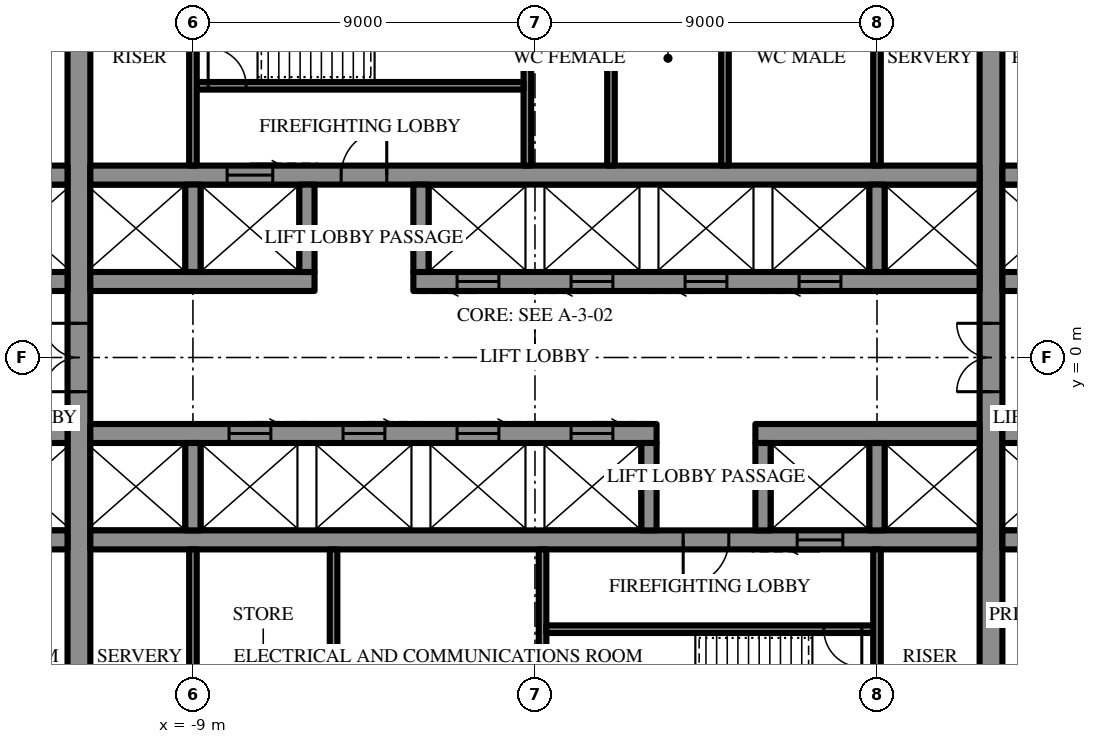
"""IFC4 building model, lengths in metres.
Left out: names, types, materials, properties, quantities, classifications, styles, units other than length and angle.
Written with IfcOpenShell. Run it as: python <this file> out.ifc"""

import sys

from ifc_helpers import new_model, si_unit, direction, frame, frame_2d, origin, place, context, subcontext, project, spatial, rectangle, extrude, element, fill, save


model = new_model("IFC4")
c1 = context("Model", 3, precision=1e-05, world=origin(), true_north=direction((0.0, 1.0)))
c2 = subcontext(c1, "Body", "Model", "MODEL_VIEW")
j1 = project(units=[si_unit("LENGTHUNIT", "METRE"), si_unit("PLANEANGLEUNIT", "RADIAN")], contexts=[c1])
p1 = place(None, origin())
s1 = spatial("IfcSite", under=j1, at=p1, CompositionType="ELEMENT")
p2 = place(p1, origin())
s2 = spatial("IfcBuilding", under=s1, at=p2, CompositionType="ELEMENT")
p3 = place(p2, frame((0.0, 0.0, 140.5)))
s3 = spatial("IfcBuildingStorey", under=s2, at=p3, CompositionType="ELEMENT", Elevation=140.5)
p4 = place(p3, frame((12.0, -10.7, 0.0), z_axis=(0.0, 0.0, 1.0), x_axis=(0.0, 1.0, 0.0)))
e1 = element("IfcWall", 1, at=p4, inside=s3, PredefinedType="SHEAR", context=c2, shape_type="SweptSolid", body=[
    extrude(rectangle(XDim=21.4, YDim=0.6, at=frame_2d((10.7, 0.0))), origin(), (0.0, 0.0, 1.0), 4.2),
])
p5 = place(p4, frame((9.8, 0.0, 0.0)))
e2 = element("IfcOpeningElement", 2, at=p5, cuts=e1, PredefinedType="OPENING", context=c2, shape_type="SweptSolid", body=[
    extrude(rectangle(XDim=1.8, YDim=2.4, at=frame_2d((0.9, 1.2))), frame((0.0, 0.31, 0.0), z_axis=(0.0, -1.0, 0.0), x_axis=(1.0, 0.0, 0.0)), (0.0, 0.0, 1.0), 0.62),
])
p6 = place(p3, frame((-12.0, -10.7, 0.0), z_axis=(0.0, 0.0, 1.0), x_axis=(0.0, 1.0, 0.0)))
e3 = element("IfcWall", 3, at=p6, inside=s3, PredefinedType="SHEAR", context=c2, shape_type="SweptSolid", body=[
    extrude(rectangle(XDim=21.4, YDim=0.6, at=frame_2d((10.7, 0.0))), origin(), (0.0, 0.0, 1.0), 4.2),
])
p7 = place(p6, frame((9.8, 0.0, 0.0)))
e4 = element("IfcOpeningElement", 4, at=p7, cuts=e3, PredefinedType="OPENING", context=c2, shape_type="SweptSolid", body=[
    extrude(rectangle(XDim=1.8, YDim=2.4, at=frame_2d((0.9, 1.2))), frame((0.0, 0.31, 0.0), z_axis=(0.0, -1.0, 0.0), x_axis=(1.0, 0.0, 0.0)), (0.0, 0.0, 1.0), 0.62),
])
p8 = place(p3, frame((-14.7, 2.0, 0.0), z_axis=(0.0, 0.0, 1.0), x_axis=(1.0, 0.0, 0.0)))
e5 = element("IfcWall", 5, at=p8, inside=s3, PredefinedType="SHEAR", context=c2, shape_type="SweptSolid", body=[
    extrude(rectangle(XDim=2.4, YDim=0.5, at=frame_2d((1.2, 0.0))), origin(), (0.0, 0.0, 1.0), 4.2),
])
p9 = place(p3, frame((-11.7, 2.0, 0.0), z_axis=(0.0, 0.0, 1.0), x_axis=(1.0, 0.0, 0.0)))
e6 = element("IfcWall", 6, at=p9, inside=s3, PredefinedType="SHEAR", context=c2, shape_type="SweptSolid", body=[
    extrude(rectangle(XDim=5.9, YDim=0.5, at=frame_2d((2.95, 0.0))), origin(), (0.0, 0.0, 1.0), 4.2),
])
p10 = place(p3, frame((-3.2, 2.0, 0.0), z_axis=(0.0, 0.0, 1.0), x_axis=(1.0, 0.0, 0.0)))
e7 = element("IfcWall", 7, at=p10, inside=s3, PredefinedType="SHEAR", context=c2, shape_type="SweptSolid", body=[
    extrude(rectangle(XDim=14.9, YDim=0.5, at=frame_2d((7.45, 0.0))), origin(), (0.0, 0.0, 1.0), 4.2),
])
p11 = place(p10, frame((1.15, 0.0, 0.0)))
e8 = element("IfcOpeningElement", 8, at=p11, cuts=e7, PredefinedType="OPENING", context=c2, shape_type="SweptSolid", body=[
    extrude(rectangle(XDim=1.1, YDim=2.2, at=frame_2d((0.55, 1.1))), frame((0.0, 0.26, 0.0), z_axis=(0.0, -1.0, 0.0), x_axis=(1.0, 0.0, 0.0)), (0.0, 0.0, 1.0), 0.52),
])
p12 = place(p10, frame((4.15, 0.0, 0.0)))
e9 = element("IfcOpeningElement", 9, at=p12, cuts=e7, PredefinedType="OPENING", context=c2, shape_type="SweptSolid", body=[
    extrude(rectangle(XDim=1.1, YDim=2.2, at=frame_2d((0.55, 1.1))), frame((0.0, 0.26, 0.0), z_axis=(0.0, -1.0, 0.0), x_axis=(1.0, 0.0, 0.0)), (0.0, 0.0, 1.0), 0.52),
])
p13 = place(p10, frame((7.15, 0.0, 0.0)))
e10 = element("IfcOpeningElement", 10, at=p13, cuts=e7, PredefinedType="OPENING", context=c2, shape_type="SweptSolid", body=[
    extrude(rectangle(XDim=1.1, YDim=2.2, at=frame_2d((0.55, 1.1))), frame((0.0, 0.26, 0.0), z_axis=(0.0, -1.0, 0.0), x_axis=(1.0, 0.0, 0.0)), (0.0, 0.0, 1.0), 0.52),
])
p14 = place(p10, frame((10.15, 0.0, 0.0)))
e11 = element("IfcOpeningElement", 11, at=p14, cuts=e7, PredefinedType="OPENING", context=c2, shape_type="SweptSolid", body=[
    extrude(rectangle(XDim=1.1, YDim=2.2, at=frame_2d((0.55, 1.1))), frame((0.0, 0.26, 0.0), z_axis=(0.0, -1.0, 0.0), x_axis=(1.0, 0.0, 0.0)), (0.0, 0.0, 1.0), 0.52),
])
for number, where, z_axis, x_axis in (
    (12, (12.3, 2.0, 0.0), (0.0, 0.0, 1.0), (1.0, 0.0, 0.0)),
    (13, (-14.7, 4.8, 0.0), (0.0, 0.0, 1.0), (1.0, 0.0, 0.0)),
):
    element("IfcWall", number, at=place(p3, frame(where, z_axis=z_axis, x_axis=x_axis)), inside=s3, PredefinedType="SHEAR", context=c2, shape_type="SweptSolid", body=[
        extrude(rectangle(XDim=2.4, YDim=0.5, at=frame_2d((1.2, 0.0))), origin(), (0.0, 0.0, 1.0), 4.2),
    ])
p15 = place(p3, frame((-11.7, 4.8, 0.0), z_axis=(0.0, 0.0, 1.0), x_axis=(1.0, 0.0, 0.0)))
e14 = element("IfcWall", 14, at=p15, inside=s3, PredefinedType="SHEAR", context=c2, shape_type="SweptSolid", body=[
    extrude(rectangle(XDim=23.4, YDim=0.5, at=frame_2d((11.7, 0.0))), origin(), (0.0, 0.0, 1.0), 4.2),
])
p16 = place(p15, frame((6.6, 0.0, 0.0)))
e15 = element("IfcOpeningElement", 15, at=p16, cuts=e14, PredefinedType="OPENING", context=c2, shape_type="SweptSolid", body=[
    extrude(rectangle(XDim=1.2, YDim=2.2, at=frame_2d((0.6, 1.1))), frame((0.0, 0.26, 0.0), z_axis=(0.0, -1.0, 0.0), x_axis=(1.0, 0.0, 0.0)), (0.0, 0.0, 1.0), 0.52),
])
p17 = place(p15, frame((3.6, 0.0, 0.0)))
e16 = element("IfcOpeningElement", 16, at=p17, cuts=e14, PredefinedType="OPENING", context=c2, shape_type="SweptSolid", body=[
    extrude(rectangle(XDim=1.2, YDim=2.2, at=frame_2d((0.6, 1.1))), frame((0.0, 0.26, 0.0), z_axis=(0.0, -1.0, 0.0), x_axis=(1.0, 0.0, 0.0)), (0.0, 0.0, 1.0), 0.52),
])
p18 = place(p3, frame((12.3, 4.8, 0.0), z_axis=(0.0, 0.0, 1.0), x_axis=(1.0, 0.0, 0.0)))
e17 = element("IfcWall", 17, at=p18, inside=s3, PredefinedType="SHEAR", context=c2, shape_type="SweptSolid", body=[
    extrude(rectangle(XDim=2.4, YDim=0.5, at=frame_2d((1.2, 0.0))), origin(), (0.0, 0.0, 1.0), 4.2),
])
for number, where, z_axis, x_axis in (
    (18, (-9.0, 2.25, 0.0), (0.0, 0.0, 1.0), (0.0, 1.0, 0.0)),
    (19, (-6.0, 2.25, 0.0), (0.0, 0.0, 1.0), (0.0, 1.0, 0.0)),
    (20, (-3.0, 2.25, 0.0), (0.0, 0.0, 1.0), (0.0, 1.0, 0.0)),
    (21, (9.0, 2.25, 0.0), (0.0, 0.0, 1.0), (0.0, 1.0, 0.0)),
):
    element("IfcWall", number, at=place(p3, frame(where, z_axis=z_axis, x_axis=x_axis)), inside=s3, PredefinedType="SHEAR", context=c2, shape_type="SweptSolid", body=[
        extrude(rectangle(XDim=2.3, YDim=0.4, at=frame_2d((1.15, 0.0))), origin(), (0.0, 0.0, 1.0), 4.2),
    ])
p19 = place(p3, frame((-0.2, 5.05, 0.0), z_axis=(0.0, 0.0, 1.0), x_axis=(0.0, 1.0, 0.0)))
e22 = element("IfcWall", 22, at=p19, inside=s3, PredefinedType="SHEAR", context=c2, shape_type="SweptSolid", body=[
    extrude(rectangle(XDim=5.65, YDim=0.2, at=frame_2d((2.825, 0.0))), origin(), (0.0, 0.0, 1.0), 4.2),
])
p20 = place(p3, frame((-8.9, 7.15, 0.0), z_axis=(0.0, 0.0, 1.0), x_axis=(1.0, 0.0, 0.0)))
e23 = element("IfcWall", 23, at=p20, inside=s3, PredefinedType="SHEAR", context=c2, shape_type="SweptSolid", body=[
    extrude(rectangle(XDim=8.6, YDim=0.2, at=frame_2d((4.3, 0.0))), origin(), (0.0, 0.0, 1.0), 4.2),
])
p21 = place(p20, frame((0.3, 0.0, 0.0)))
e24 = element("IfcOpeningElement", 24, at=p21, cuts=e23, PredefinedType="OPENING", context=c2, shape_type="SweptSolid", body=[
    extrude(rectangle(XDim=1.0, YDim=2.2, at=frame_2d((0.5, 1.1))), frame((0.0, 0.11, 0.0), z_axis=(0.0, -1.0, 0.0), x_axis=(1.0, 0.0, 0.0)), (0.0, 0.0, 1.0), 0.22),
])
p22 = place(p3, frame((14.7, -2.0, 0.0), z_axis=(0.0, 0.0, 1.0), x_axis=(-1.0, 0.0, 0.0)))
e25 = element("IfcWall", 25, at=p22, inside=s3, PredefinedType="SHEAR", context=c2, shape_type="SweptSolid", body=[
    extrude(rectangle(XDim=2.4, YDim=0.5, at=frame_2d((1.2, 0.0))), origin(), (0.0, 0.0, 1.0), 4.2),
])
p23 = place(p3, frame((11.7, -2.0, 0.0), z_axis=(0.0, 0.0, 1.0), x_axis=(-1.0, 0.0, 0.0)))
e26 = element("IfcWall", 26, at=p23, inside=s3, PredefinedType="SHEAR", context=c2, shape_type="SweptSolid", body=[
    extrude(rectangle(XDim=5.9, YDim=0.5, at=frame_2d((2.95, 0.0))), origin(), (0.0, 0.0, 1.0), 4.2),
])
p24 = place(p3, frame((3.2, -2.0, 0.0), z_axis=(0.0, 0.0, 1.0), x_axis=(-1.0, 0.0, 0.0)))
e27 = element("IfcWall", 27, at=p24, inside=s3, PredefinedType="SHEAR", context=c2, shape_type="SweptSolid", body=[
    extrude(rectangle(XDim=14.9, YDim=0.5, at=frame_2d((7.45, 0.0))), origin(), (0.0, 0.0, 1.0), 4.2),
])
p25 = place(p24, frame((1.15, 0.0, 0.0)))
e28 = element("IfcOpeningElement", 28, at=p25, cuts=e27, PredefinedType="OPENING", context=c2, shape_type="SweptSolid", body=[
    extrude(rectangle(XDim=1.1, YDim=2.2, at=frame_2d((0.55, 1.1))), frame((0.0, 0.26, 0.0), z_axis=(0.0, -1.0, 0.0), x_axis=(1.0, 0.0, 0.0)), (0.0, 0.0, 1.0), 0.52),
])
p26 = place(p24, frame((4.15, 0.0, 0.0)))
e29 = element("IfcOpeningElement", 29, at=p26, cuts=e27, PredefinedType="OPENING", context=c2, shape_type="SweptSolid", body=[
    extrude(rectangle(XDim=1.1, YDim=2.2, at=frame_2d((0.55, 1.1))), frame((0.0, 0.26, 0.0), z_axis=(0.0, -1.0, 0.0), x_axis=(1.0, 0.0, 0.0)), (0.0, 0.0, 1.0), 0.52),
])
p27 = place(p24, frame((7.15, 0.0, 0.0)))
e30 = element("IfcOpeningElement", 30, at=p27, cuts=e27, PredefinedType="OPENING", context=c2, shape_type="SweptSolid", body=[
    extrude(rectangle(XDim=1.1, YDim=2.2, at=frame_2d((0.55, 1.1))), frame((0.0, 0.26, 0.0), z_axis=(0.0, -1.0, 0.0), x_axis=(1.0, 0.0, 0.0)), (0.0, 0.0, 1.0), 0.52),
])
p28 = place(p24, frame((10.15, 0.0, 0.0)))
e31 = element("IfcOpeningElement", 31, at=p28, cuts=e27, PredefinedType="OPENING", context=c2, shape_type="SweptSolid", body=[
    extrude(rectangle(XDim=1.1, YDim=2.2, at=frame_2d((0.55, 1.1))), frame((0.0, 0.26, 0.0), z_axis=(0.0, -1.0, 0.0), x_axis=(1.0, 0.0, 0.0)), (0.0, 0.0, 1.0), 0.52),
])
for number, where, z_axis, x_axis in (
    (32, (-12.3, -2.0, 0.0), (0.0, 0.0, 1.0), (-1.0, 0.0, 0.0)),
    (33, (14.7, -4.8, 0.0), (0.0, 0.0, 1.0), (-1.0, 0.0, 0.0)),
):
    element("IfcWall", number, at=place(p3, frame(where, z_axis=z_axis, x_axis=x_axis)), inside=s3, PredefinedType="SHEAR", context=c2, shape_type="SweptSolid", body=[
        extrude(rectangle(XDim=2.4, YDim=0.5, at=frame_2d((1.2, 0.0))), origin(), (0.0, 0.0, 1.0), 4.2),
    ])
p29 = place(p3, frame((11.7, -4.8, 0.0), z_axis=(0.0, 0.0, 1.0), x_axis=(-1.0, 0.0, 0.0)))
e34 = element("IfcWall", 34, at=p29, inside=s3, PredefinedType="SHEAR", context=c2, shape_type="SweptSolid", body=[
    extrude(rectangle(XDim=23.4, YDim=0.5, at=frame_2d((11.7, 0.0))), origin(), (0.0, 0.0, 1.0), 4.2),
])
p30 = place(p29, frame((6.6, 0.0, 0.0)))
e35 = element("IfcOpeningElement", 35, at=p30, cuts=e34, PredefinedType="OPENING", context=c2, shape_type="SweptSolid", body=[
    extrude(rectangle(XDim=1.2, YDim=2.2, at=frame_2d((0.6, 1.1))), frame((0.0, 0.26, 0.0), z_axis=(0.0, -1.0, 0.0), x_axis=(1.0, 0.0, 0.0)), (0.0, 0.0, 1.0), 0.52),
])
p31 = place(p29, frame((3.6, 0.0, 0.0)))
e36 = element("IfcOpeningElement", 36, at=p31, cuts=e34, PredefinedType="OPENING", context=c2, shape_type="SweptSolid", body=[
    extrude(rectangle(XDim=1.2, YDim=2.2, at=frame_2d((0.6, 1.1))), frame((0.0, 0.26, 0.0), z_axis=(0.0, -1.0, 0.0), x_axis=(1.0, 0.0, 0.0)), (0.0, 0.0, 1.0), 0.52),
])
p32 = place(p3, frame((-12.3, -4.8, 0.0), z_axis=(0.0, 0.0, 1.0), x_axis=(-1.0, 0.0, 0.0)))
e37 = element("IfcWall", 37, at=p32, inside=s3, PredefinedType="SHEAR", context=c2, shape_type="SweptSolid", body=[
    extrude(rectangle(XDim=2.4, YDim=0.5, at=frame_2d((1.2, 0.0))), origin(), (0.0, 0.0, 1.0), 4.2),
])
for number, where, z_axis, x_axis in (
    (38, (9.0, -2.25, 0.0), (0.0, 0.0, 1.0), (0.0, -1.0, 0.0)),
    (39, (6.0, -2.25, 0.0), (0.0, 0.0, 1.0), (0.0, -1.0, 0.0)),
    (40, (3.0, -2.25, 0.0), (0.0, 0.0, 1.0), (0.0, -1.0, 0.0)),
    (41, (-9.0, -2.25, 0.0), (0.0, 0.0, 1.0), (0.0, -1.0, 0.0)),
):
    element("IfcWall", number, at=place(p3, frame(where, z_axis=z_axis, x_axis=x_axis)), inside=s3, PredefinedType="SHEAR", context=c2, shape_type="SweptSolid", body=[
        extrude(rectangle(XDim=2.3, YDim=0.4, at=frame_2d((1.15, 0.0))), origin(), (0.0, 0.0, 1.0), 4.2),
    ])
p33 = place(p3, frame((0.2, -5.05, 0.0), z_axis=(0.0, 0.0, 1.0), x_axis=(0.0, -1.0, 0.0)))
e42 = element("IfcWall", 42, at=p33, inside=s3, PredefinedType="SHEAR", context=c2, shape_type="SweptSolid", body=[
    extrude(rectangle(XDim=5.65, YDim=0.2, at=frame_2d((2.825, 0.0))), origin(), (0.0, 0.0, 1.0), 4.2),
])
p34 = place(p3, frame((8.9, -7.15, 0.0), z_axis=(0.0, 0.0, 1.0), x_axis=(-1.0, 0.0, 0.0)))
e43 = element("IfcWall", 43, at=p34, inside=s3, PredefinedType="SHEAR", context=c2, shape_type="SweptSolid", body=[
    extrude(rectangle(XDim=8.6, YDim=0.2, at=frame_2d((4.3, 0.0))), origin(), (0.0, 0.0, 1.0), 4.2),
])
p35 = place(p34, frame((0.3, 0.0, 0.0)))
e44 = element("IfcOpeningElement", 44, at=p35, cuts=e43, PredefinedType="OPENING", context=c2, shape_type="SweptSolid", body=[
    extrude(rectangle(XDim=1.0, YDim=2.2, at=frame_2d((0.5, 1.1))), frame((0.0, 0.11, 0.0), z_axis=(0.0, -1.0, 0.0), x_axis=(1.0, 0.0, 0.0)), (0.0, 0.0, 1.0), 0.22),
])
for number, where, z_axis, x_axis in (
    (45, (-9.0, 5.05, 0.0), (0.0, 0.0, 1.0), (0.0, 1.0, 0.0)),
    (46, (9.0, 5.05, 0.0), (0.0, 0.0, 1.0), (0.0, 1.0, 0.0)),
    (47, (2.0, 5.05, 0.0), (0.0, 0.0, 1.0), (0.0, 1.0, 0.0)),
    (48, (5.0, 5.05, 0.0), (0.0, 0.0, 1.0), (0.0, 1.0, 0.0)),
    (49, (9.0, -5.05, 0.0), (0.0, 0.0, 1.0), (0.0, -1.0, 0.0)),
    (50, (-9.0, -5.05, 0.0), (0.0, 0.0, 1.0), (0.0, -1.0, 0.0)),
    (51, (-5.3, -5.05, 0.0), (0.0, 0.0, 1.0), (0.0, -1.0, 0.0)),
):
    element("IfcWall", number, at=place(p3, frame(where, z_axis=z_axis, x_axis=x_axis)), inside=s3, PredefinedType="PARTITIONING", context=c2, shape_type="SweptSolid", body=[
        extrude(rectangle(XDim=5.65, YDim=0.2, at=frame_2d((2.825, 0.0))), origin(), (0.0, 0.0, 1.0), 4.0),
    ])
p36 = place(p16, origin())
e52 = element("IfcDoor", 52, at=p36, inside=s3, OperationType="SINGLE_SWING_LEFT", PredefinedType="DOOR", context=c2, shape_type="SweptSolid", body=[
    extrude(rectangle(XDim=1.2, YDim=2.2, at=frame_2d((0.6, 1.1))), frame((0.0, 0.025, 0.0), z_axis=(0.0, -1.0, 0.0), x_axis=(1.0, 0.0, 0.0)), (0.0, 0.0, 1.0), 0.05),
])
fill(e15, e52)
p37 = place(p21, origin())
e53 = element("IfcDoor", 53, at=p37, inside=s3, OperationType="SINGLE_SWING_RIGHT", PredefinedType="DOOR", context=c2, shape_type="SweptSolid", body=[
    extrude(rectangle(XDim=1.0, YDim=2.2, at=frame_2d((0.5, 1.1))), frame((0.0, 0.025, 0.0), z_axis=(0.0, -1.0, 0.0), x_axis=(1.0, 0.0, 0.0)), (0.0, 0.0, 1.0), 0.05),
])
fill(e24, e53)
p38 = place(p30, origin())
e54 = element("IfcDoor", 54, at=p38, inside=s3, OperationType="SINGLE_SWING_LEFT", PredefinedType="DOOR", context=c2, shape_type="SweptSolid", body=[
    extrude(rectangle(XDim=1.2, YDim=2.2, at=frame_2d((0.6, 1.1))), frame((0.0, 0.025, 0.0), z_axis=(0.0, -1.0, 0.0), x_axis=(1.0, 0.0, 0.0)), (0.0, 0.0, 1.0), 0.05),
])
fill(e35, e54)
p39 = place(p35, origin())
e55 = element("IfcDoor", 55, at=p39, inside=s3, OperationType="SINGLE_SWING_RIGHT", PredefinedType="DOOR", context=c2, shape_type="SweptSolid", body=[
    extrude(rectangle(XDim=1.0, YDim=2.2, at=frame_2d((0.5, 1.1))), frame((0.0, 0.025, 0.0), z_axis=(0.0, -1.0, 0.0), x_axis=(1.0, 0.0, 0.0)), (0.0, 0.0, 1.0), 0.05),
])
fill(e44, e55)
p40 = place(p5, origin())
e56 = element("IfcDoor", 56, at=p40, inside=s3, OperationType="DOUBLE_DOOR_SINGLE_SWING", PredefinedType="DOOR", context=c2, shape_type="SweptSolid", body=[
    extrude(rectangle(XDim=1.8, YDim=2.4, at=frame_2d((0.9, 1.2))), frame((0.0, 0.025, 0.0), z_axis=(0.0, -1.0, 0.0), x_axis=(1.0, 0.0, 0.0)), (0.0, 0.0, 1.0), 0.05),
])
fill(e2, e56)
p41 = place(p7, origin())
e57 = element("IfcDoor", 57, at=p41, inside=s3, OperationType="DOUBLE_DOOR_SINGLE_SWING", PredefinedType="DOOR", context=c2, shape_type="SweptSolid", body=[
    extrude(rectangle(XDim=1.8, YDim=2.4, at=frame_2d((0.9, 1.2))), frame((0.0, 0.025, 0.0), z_axis=(0.0, -1.0, 0.0), x_axis=(1.0, 0.0, 0.0)), (0.0, 0.0, 1.0), 0.05),
])
fill(e4, e57)
p42 = place(p17, origin())
e58 = element("IfcDoor", 58, at=p42, inside=s3, OperationType="SLIDING_TO_LEFT", PredefinedType="DOOR", context=c2, shape_type="SweptSolid", body=[
    extrude(rectangle(XDim=1.2, YDim=2.2, at=frame_2d((0.6, 1.1))), frame((0.0, 0.025, 0.0), z_axis=(0.0, -1.0, 0.0), x_axis=(1.0, 0.0, 0.0)), (0.0, 0.0, 1.0), 0.05),
])
fill(e16, e58)
p43 = place(p11, frame((1.1, 0.0, 0.0), z_axis=(0.0, 0.0, 1.0), x_axis=(-1.0, 0.0, 0.0)))
e59 = element("IfcDoor", 59, at=p43, inside=s3, OperationType="SLIDING_TO_LEFT", PredefinedType="DOOR", context=c2, shape_type="SweptSolid", body=[
    extrude(rectangle(XDim=1.1, YDim=2.2, at=frame_2d((0.55, 1.1))), frame((0.0, 0.025, 0.0), z_axis=(0.0, -1.0, 0.0), x_axis=(1.0, 0.0, 0.0)), (0.0, 0.0, 1.0), 0.05),
])
fill(e8, e59)
p44 = place(p12, frame((1.1, 0.0, 0.0), z_axis=(0.0, 0.0, 1.0), x_axis=(-1.0, 0.0, 0.0)))
e60 = element("IfcDoor", 60, at=p44, inside=s3, OperationType="SLIDING_TO_LEFT", PredefinedType="DOOR", context=c2, shape_type="SweptSolid", body=[
    extrude(rectangle(XDim=1.1, YDim=2.2, at=frame_2d((0.55, 1.1))), frame((0.0, 0.025, 0.0), z_axis=(0.0, -1.0, 0.0), x_axis=(1.0, 0.0, 0.0)), (0.0, 0.0, 1.0), 0.05),
])
fill(e9, e60)
p45 = place(p13, frame((1.1, 0.0, 0.0), z_axis=(0.0, 0.0, 1.0), x_axis=(-1.0, 0.0, 0.0)))
e61 = element("IfcDoor", 61, at=p45, inside=s3, OperationType="SLIDING_TO_LEFT", PredefinedType="DOOR", context=c2, shape_type="SweptSolid", body=[
    extrude(rectangle(XDim=1.1, YDim=2.2, at=frame_2d((0.55, 1.1))), frame((0.0, 0.025, 0.0), z_axis=(0.0, -1.0, 0.0), x_axis=(1.0, 0.0, 0.0)), (0.0, 0.0, 1.0), 0.05),
])
fill(e10, e61)
p46 = place(p14, frame((1.1, 0.0, 0.0), z_axis=(0.0, 0.0, 1.0), x_axis=(-1.0, 0.0, 0.0)))
e62 = element("IfcDoor", 62, at=p46, inside=s3, OperationType="SLIDING_TO_LEFT", PredefinedType="DOOR", context=c2, shape_type="SweptSolid", body=[
    extrude(rectangle(XDim=1.1, YDim=2.2, at=frame_2d((0.55, 1.1))), frame((0.0, 0.025, 0.0), z_axis=(0.0, -1.0, 0.0), x_axis=(1.0, 0.0, 0.0)), (0.0, 0.0, 1.0), 0.05),
])
fill(e11, e62)
p47 = place(p31, origin())
e63 = element("IfcDoor", 63, at=p47, inside=s3, OperationType="SLIDING_TO_LEFT", PredefinedType="DOOR", context=c2, shape_type="SweptSolid", body=[
    extrude(rectangle(XDim=1.2, YDim=2.2, at=frame_2d((0.6, 1.1))), frame((0.0, 0.025, 0.0), z_axis=(0.0, -1.0, 0.0), x_axis=(1.0, 0.0, 0.0)), (0.0, 0.0, 1.0), 0.05),
])
fill(e36, e63)
p48 = place(p25, frame((1.1, 0.0, 0.0), z_axis=(0.0, 0.0, 1.0), x_axis=(-1.0, 0.0, 0.0)))
e64 = element("IfcDoor", 64, at=p48, inside=s3, OperationType="SLIDING_TO_LEFT", PredefinedType="DOOR", context=c2, shape_type="SweptSolid", body=[
    extrude(rectangle(XDim=1.1, YDim=2.2, at=frame_2d((0.55, 1.1))), frame((0.0, 0.025, 0.0), z_axis=(0.0, -1.0, 0.0), x_axis=(1.0, 0.0, 0.0)), (0.0, 0.0, 1.0), 0.05),
])
fill(e28, e64)
p49 = place(p26, frame((1.1, 0.0, 0.0), z_axis=(0.0, 0.0, 1.0), x_axis=(-1.0, 0.0, 0.0)))
e65 = element("IfcDoor", 65, at=p49, inside=s3, OperationType="SLIDING_TO_LEFT", PredefinedType="DOOR", context=c2, shape_type="SweptSolid", body=[
    extrude(rectangle(XDim=1.1, YDim=2.2, at=frame_2d((0.55, 1.1))), frame((0.0, 0.025, 0.0), z_axis=(0.0, -1.0, 0.0), x_axis=(1.0, 0.0, 0.0)), (0.0, 0.0, 1.0), 0.05),
])
fill(e29, e65)
p50 = place(p27, frame((1.1, 0.0, 0.0), z_axis=(0.0, 0.0, 1.0), x_axis=(-1.0, 0.0, 0.0)))
e66 = element("IfcDoor", 66, at=p50, inside=s3, OperationType="SLIDING_TO_LEFT", PredefinedType="DOOR", context=c2, shape_type="SweptSolid", body=[
    extrude(rectangle(XDim=1.1, YDim=2.2, at=frame_2d((0.55, 1.1))), frame((0.0, 0.025, 0.0), z_axis=(0.0, -1.0, 0.0), x_axis=(1.0, 0.0, 0.0)), (0.0, 0.0, 1.0), 0.05),
])
fill(e30, e66)
p51 = place(p28, frame((1.1, 0.0, 0.0), z_axis=(0.0, 0.0, 1.0), x_axis=(-1.0, 0.0, 0.0)))
e67 = element("IfcDoor", 67, at=p51, inside=s3, OperationType="SLIDING_TO_LEFT", PredefinedType="DOOR", context=c2, shape_type="SweptSolid", body=[
    extrude(rectangle(XDim=1.1, YDim=2.2, at=frame_2d((0.55, 1.1))), frame((0.0, 0.025, 0.0), z_axis=(0.0, -1.0, 0.0), x_axis=(1.0, 0.0, 0.0)), (0.0, 0.0, 1.0), 0.05),
])
fill(e31, e67)
save(model, sys.argv[1])
